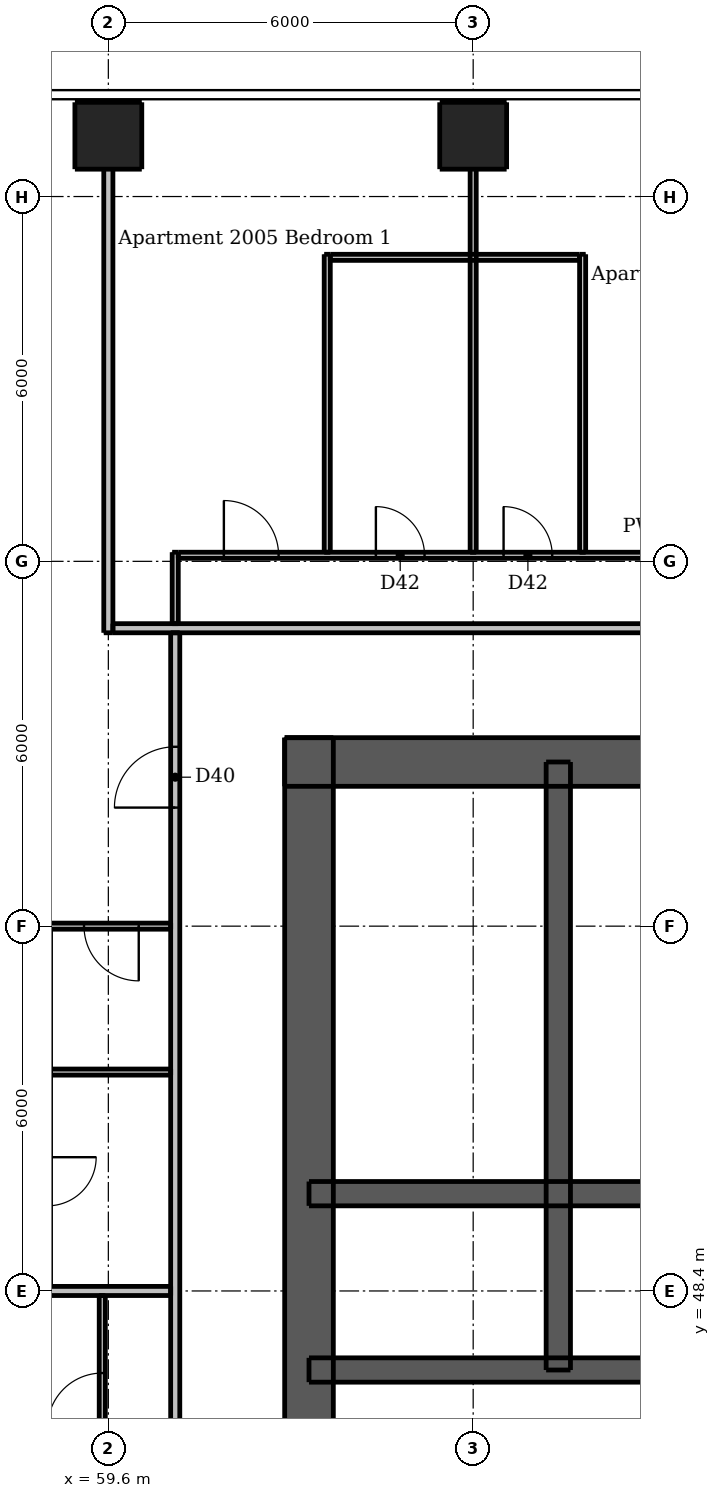
"""IFC4 building model, lengths in metres.
Left out: names, types, materials, properties, quantities, classifications, styles, units other than length and angle.
Written with IfcOpenShell. Run it as: python <this file> out.ifc"""

import sys

from ifc_helpers import new_model, si_unit, direction, frame, frame_2d, origin, origin_2d, place, context, subcontext, project, spatial, rectangle, extrude, element, fill, save


model = new_model("IFC4")
c1 = context("Model", 3, precision=1e-05, world=origin(), true_north=direction((0.0, 1.0)))
c2 = subcontext(c1, "Body", "Model", "MODEL_VIEW")
j1 = project(units=[si_unit("LENGTHUNIT", "METRE"), si_unit("PLANEANGLEUNIT", "RADIAN")], contexts=[c1])
p1 = place(None, origin())
s1 = spatial("IfcSite", under=j1, at=p1, CompositionType="ELEMENT")
p2 = place(p1, origin())
s2 = spatial("IfcBuilding", under=s1, at=p2, CompositionType="ELEMENT")
p3 = place(p2, frame((0.0, 0.0, 78.7)))
s3 = spatial("IfcBuildingStorey", under=s2, at=p3, CompositionType="ELEMENT", Elevation=78.7)
p4 = place(p3, frame((62.5, 57.1, 0.0), z_axis=(0.0, 0.0, 1.0), x_axis=(1.0, 0.0, 0.0)))
e1 = element("IfcWall", 1, at=p4, inside=s3, PredefinedType="SHEAR", context=c2, shape_type="SweptSolid", body=[
    extrude(rectangle(XDim=24.0, YDim=0.8, at=frame_2d((12.0, 0.0))), origin(), (0.0, 0.0, 1.0), 3.05),
])
p5 = place(p4, frame((20.9, 0.0, 0.0)))
e2 = element("IfcOpeningElement", 2, at=p5, cuts=e1, PredefinedType="OPENING", context=c2, shape_type="SweptSolid", body=[
    extrude(rectangle(XDim=1.1, YDim=2.1, at=frame_2d((0.55, 1.05))), frame((0.0, 0.41, 0.0), z_axis=(0.0, -1.0, 0.0), x_axis=(1.0, 0.0, 0.0)), (0.0, 0.0, 1.0), 0.82),
])
p6 = place(p4, frame((2.0, 0.0, 0.0)))
e3 = element("IfcOpeningElement", 3, at=p6, cuts=e1, PredefinedType="OPENING", context=c2, shape_type="SweptSolid", body=[
    extrude(rectangle(XDim=1.1, YDim=2.1, at=frame_2d((0.55, 1.05))), frame((0.0, 0.41, 0.0), z_axis=(0.0, -1.0, 0.0), x_axis=(1.0, 0.0, 0.0)), (0.0, 0.0, 1.0), 0.82),
])
p7 = place(p4, frame((6.075, 0.0, 0.0)))
e4 = element("IfcOpeningElement", 4, at=p7, cuts=e1, PredefinedType="OPENING", context=c2, shape_type="SweptSolid", body=[
    extrude(rectangle(XDim=0.9, YDim=2.1, at=frame_2d((0.45, 1.05))), frame((0.0, 0.41, 0.0), z_axis=(0.0, -1.0, 0.0), x_axis=(1.0, 0.0, 0.0)), (0.0, 0.0, 1.0), 0.82),
])
p8 = place(p4, frame((10.455, 0.0, 0.0)))
e5 = element("IfcOpeningElement", 5, at=p8, cuts=e1, PredefinedType="OPENING", context=c2, shape_type="SweptSolid", body=[
    extrude(rectangle(XDim=0.9, YDim=2.1, at=frame_2d((0.45, 1.05))), frame((0.0, 0.41, 0.0), z_axis=(0.0, -1.0, 0.0), x_axis=(1.0, 0.0, 0.0)), (0.0, 0.0, 1.0), 0.82),
])
p9 = place(p4, frame((15.93, 0.0, 0.0)))
e6 = element("IfcOpeningElement", 6, at=p9, cuts=e1, PredefinedType="OPENING", context=c2, shape_type="SweptSolid", body=[
    extrude(rectangle(XDim=0.9, YDim=2.1, at=frame_2d((0.45, 1.05))), frame((0.0, 0.41, 0.0), z_axis=(0.0, -1.0, 0.0), x_axis=(1.0, 0.0, 0.0)), (0.0, 0.0, 1.0), 0.82),
])
p10 = place(p3, frame((62.9, 33.5, 0.0), z_axis=(0.0, 0.0, 1.0), x_axis=(0.0, 1.0, 0.0)))
e7 = element("IfcWall", 7, at=p10, inside=s3, PredefinedType="SHEAR", context=c2, shape_type="SweptSolid", body=[
    extrude(rectangle(XDim=24.0, YDim=0.8, at=frame_2d((12.0, 0.0))), origin(), (0.0, 0.0, 1.0), 3.05),
])
p11 = place(p10, frame((11.2, 0.0, 0.0)))
e8 = element("IfcOpeningElement", 8, at=p11, cuts=e7, PredefinedType="OPENING", context=c2, shape_type="SweptSolid", body=[
    extrude(rectangle(XDim=1.6, YDim=2.1, at=frame_2d((0.8, 1.05))), frame((0.0, 0.41, 0.0), z_axis=(0.0, -1.0, 0.0), x_axis=(1.0, 0.0, 0.0)), (0.0, 0.0, 1.0), 0.82),
])
p12 = place(p3, frame((62.9, 47.1, 0.0), z_axis=(0.0, 0.0, 1.0), x_axis=(1.0, 0.0, 0.0)))
e9 = element("IfcWall", 9, at=p12, inside=s3, PredefinedType="SHEAR", context=c2, shape_type="SweptSolid", body=[
    extrude(rectangle(XDim=23.2, YDim=0.4, at=frame_2d((11.6, 0.0))), origin(), (0.0, 0.0, 1.0), 3.05),
])
p13 = place(p12, frame((1.7, 0.0, 0.0)))
e10 = element("IfcOpeningElement", 10, at=p13, cuts=e9, PredefinedType="OPENING", context=c2, shape_type="SweptSolid", body=[
    extrude(rectangle(XDim=0.9, YDim=2.1, at=frame_2d((0.45, 1.05))), frame((0.0, 0.21, 0.0), z_axis=(0.0, -1.0, 0.0), x_axis=(1.0, 0.0, 0.0)), (0.0, 0.0, 1.0), 0.42),
])
p14 = place(p12, frame((20.6, 0.0, 0.0)))
e11 = element("IfcOpeningElement", 11, at=p14, cuts=e9, PredefinedType="OPENING", context=c2, shape_type="SweptSolid", body=[
    extrude(rectangle(XDim=0.9, YDim=2.1, at=frame_2d((0.45, 1.05))), frame((0.0, 0.21, 0.0), z_axis=(0.0, -1.0, 0.0), x_axis=(1.0, 0.0, 0.0)), (0.0, 0.0, 1.0), 0.42),
])
p15 = place(p3, frame((62.9, 50.0, 0.0), z_axis=(0.0, 0.0, 1.0), x_axis=(1.0, 0.0, 0.0)))
e12 = element("IfcWall", 12, at=p15, inside=s3, PredefinedType="SHEAR", context=c2, shape_type="SweptSolid", body=[
    extrude(rectangle(XDim=23.2, YDim=0.4, at=frame_2d((11.6, 0.0))), origin(), (0.0, 0.0, 1.0), 3.05),
])
p16 = place(p3, frame((67.0, 47.1, 0.0), z_axis=(0.0, 0.0, 1.0), x_axis=(0.0, 1.0, 0.0)))
e13 = element("IfcWall", 13, at=p16, inside=s3, PredefinedType="SHEAR", context=c2, shape_type="SweptSolid", body=[
    extrude(rectangle(XDim=10.0, YDim=0.4, at=frame_2d((5.0, 0.0))), origin(), (0.0, 0.0, 1.0), 3.05),
])
for number, where, z_axis, x_axis in (
    (14, (59.6, 67.4, 0.0), (0.0, 0.0, 1.0), (1.0, 0.0, 0.0)),
    (15, (65.6, 67.4, 0.0), (0.0, 0.0, 1.0), (1.0, 0.0, 0.0)),
):
    element("IfcColumn", number, at=place(p3, frame(where, z_axis=z_axis, x_axis=x_axis)), inside=s3, PredefinedType="COLUMN", context=c2, shape_type="SweptSolid", body=[
        extrude(rectangle(XDim=1.1, YDim=1.1, at=origin_2d()), origin(), (0.0, 0.0, 1.0), 3.05),
    ])
p17 = place(p3, frame((59.5, 31.65, 0.0), z_axis=(0.0, 0.0, 1.0), x_axis=(0.0, 1.0, 0.0)))
e16 = element("IfcWall", 16, at=p17, inside=s3, PredefinedType="PARTITIONING", context=c2, shape_type="SweptSolid", body=[
    extrude(rectangle(XDim=16.675, YDim=0.1, at=frame_2d((8.337, 0.0))), origin(), (0.0, 0.0, 1.0), 2.51),
])
p18 = place(p17, frame((0.75, 0.0, 0.0)))
e17 = element("IfcOpeningElement", 17, at=p18, cuts=e16, PredefinedType="OPENING", context=c2, shape_type="SweptSolid", body=[
    extrude(rectangle(XDim=0.9, YDim=2.1, at=frame_2d((0.45, 1.05))), frame((0.0, 0.06, 0.0), z_axis=(0.0, -1.0, 0.0), x_axis=(1.0, 0.0, 0.0)), (0.0, 0.0, 1.0), 0.12),
])
p19 = place(p17, frame((3.1, 0.0, 0.0)))
e18 = element("IfcOpeningElement", 18, at=p19, cuts=e16, PredefinedType="OPENING", context=c2, shape_type="SweptSolid", body=[
    extrude(rectangle(XDim=0.9, YDim=2.1, at=frame_2d((0.45, 1.05))), frame((0.0, 0.06, 0.0), z_axis=(0.0, -1.0, 0.0), x_axis=(1.0, 0.0, 0.0)), (0.0, 0.0, 1.0), 0.12),
])
p20 = place(p17, frame((8.5, 0.0, 0.0)))
e19 = element("IfcOpeningElement", 19, at=p20, cuts=e16, PredefinedType="OPENING", context=c2, shape_type="SweptSolid", body=[
    extrude(rectangle(XDim=0.9, YDim=2.1, at=frame_2d((0.45, 1.05))), frame((0.0, 0.06, 0.0), z_axis=(0.0, -1.0, 0.0), x_axis=(1.0, 0.0, 0.0)), (0.0, 0.0, 1.0), 0.12),
])
p21 = place(p17, frame((14.5, 0.0, 0.0)))
e20 = element("IfcOpeningElement", 20, at=p21, cuts=e16, PredefinedType="OPENING", context=c2, shape_type="SweptSolid", body=[
    extrude(rectangle(XDim=0.9, YDim=2.1, at=frame_2d((0.45, 1.05))), frame((0.0, 0.06, 0.0), z_axis=(0.0, -1.0, 0.0), x_axis=(1.0, 0.0, 0.0)), (0.0, 0.0, 1.0), 0.12),
])
p22 = place(p17, frame((5.55, 0.0, 0.0)))
e21 = element("IfcOpeningElement", 21, at=p22, cuts=e16, PredefinedType="OPENING", context=c2, shape_type="SweptSolid", body=[
    extrude(rectangle(XDim=0.8, YDim=2.1, at=frame_2d((0.4, 1.05))), frame((0.0, 0.06, 0.0), z_axis=(0.0, -1.0, 0.0), x_axis=(1.0, 0.0, 0.0)), (0.0, 0.0, 1.0), 0.12),
])
p23 = place(p17, frame((11.55, 0.0, 0.0)))
e22 = element("IfcOpeningElement", 22, at=p23, cuts=e16, PredefinedType="OPENING", context=c2, shape_type="SweptSolid", body=[
    extrude(rectangle(XDim=0.8, YDim=2.1, at=frame_2d((0.4, 1.05))), frame((0.0, 0.06, 0.0), z_axis=(0.0, -1.0, 0.0), x_axis=(1.0, 0.0, 0.0)), (0.0, 0.0, 1.0), 0.12),
])
p24 = place(p3, frame((60.7, 59.375, 0.0), z_axis=(0.0, 0.0, 1.0), x_axis=(0.0, 1.0, 0.0)))
e23 = element("IfcWall", 23, at=p24, inside=s3, PredefinedType="PARTITIONING", context=c2, shape_type="SweptSolid", body=[
    extrude(rectangle(XDim=1.175, YDim=0.1, at=frame_2d((0.587, 0.0))), origin(), (0.0, 0.0, 1.0), 3.05),
])
p25 = place(p3, frame((63.2, 60.55, 0.0), z_axis=(0.0, 0.0, 1.0), x_axis=(0.0, 1.0, 0.0)))
e24 = element("IfcWall", 24, at=p25, inside=s3, PredefinedType="PARTITIONING", context=c2, shape_type="SweptSolid", body=[
    extrude(rectangle(XDim=4.9, YDim=0.1, at=frame_2d((2.45, 0.0))), origin(), (0.0, 0.0, 1.0), 3.05),
])
p26 = place(p3, frame((65.6, 60.55, 0.0), z_axis=(0.0, 0.0, 1.0), x_axis=(0.0, 1.0, 0.0)))
e25 = element("IfcWall", 25, at=p26, inside=s3, PredefinedType="PARTITIONING", context=c2, shape_type="SweptSolid", body=[
    extrude(rectangle(XDim=7.45, YDim=0.1, at=frame_2d((3.725, 0.0))), origin(), (0.0, 0.0, 1.0), 2.516),
])
p27 = place(p3, frame((67.4, 60.55, 0.0), z_axis=(0.0, 0.0, 1.0), x_axis=(0.0, 1.0, 0.0)))
e26 = element("IfcWall", 26, at=p27, inside=s3, PredefinedType="PARTITIONING", context=c2, shape_type="SweptSolid", body=[
    extrude(rectangle(XDim=4.9, YDim=0.1, at=frame_2d((2.45, 0.0))), origin(), (0.0, 0.0, 1.0), 3.05),
])
p28 = place(p3, frame((63.25, 65.4, 0.0), z_axis=(0.0, 0.0, 1.0), x_axis=(1.0, 0.0, 0.0)))
e27 = element("IfcWall", 27, at=p28, inside=s3, PredefinedType="PARTITIONING", context=c2, shape_type="SweptSolid", body=[
    extrude(rectangle(XDim=4.1, YDim=0.1, at=frame_2d((2.05, 0.0))), origin(), (0.0, 0.0, 1.0), 3.05),
])
p29 = place(p3, frame((60.75, 60.5, 0.0), z_axis=(0.0, 0.0, 1.0), x_axis=(1.0, 0.0, 0.0)))
e28 = element("IfcWall", 28, at=p29, inside=s3, PredefinedType="PARTITIONING", context=c2, shape_type="SweptSolid", body=[
    extrude(rectangle(XDim=16.775, YDim=0.1, at=frame_2d((8.387, 0.0))), origin(), (0.0, 0.0, 1.0), 3.05),
])
p30 = place(p29, frame((8.9, 0.0, 0.0)))
e29 = element("IfcOpeningElement", 29, at=p30, cuts=e28, PredefinedType="OPENING", context=c2, shape_type="SweptSolid", body=[
    extrude(rectangle(XDim=0.9, YDim=2.1, at=frame_2d((0.45, 1.05))), frame((0.0, 0.06, 0.0), z_axis=(0.0, -1.0, 0.0), x_axis=(1.0, 0.0, 0.0)), (0.0, 0.0, 1.0), 0.12),
])
p31 = place(p29, frame((14.9, 0.0, 0.0)))
e30 = element("IfcOpeningElement", 30, at=p31, cuts=e28, PredefinedType="OPENING", context=c2, shape_type="SweptSolid", body=[
    extrude(rectangle(XDim=0.9, YDim=2.1, at=frame_2d((0.45, 1.05))), frame((0.0, 0.06, 0.0), z_axis=(0.0, -1.0, 0.0), x_axis=(1.0, 0.0, 0.0)), (0.0, 0.0, 1.0), 0.12),
])
p32 = place(p29, frame((12.5, 0.0, 0.0)))
e31 = element("IfcOpeningElement", 31, at=p32, cuts=e28, PredefinedType="OPENING", context=c2, shape_type="SweptSolid", body=[
    extrude(rectangle(XDim=0.9, YDim=2.1, at=frame_2d((0.45, 1.05))), frame((0.0, 0.06, 0.0), z_axis=(0.0, -1.0, 0.0), x_axis=(1.0, 0.0, 0.0)), (0.0, 0.0, 1.0), 0.12),
])
p33 = place(p29, frame((5.35, 0.0, 0.0)))
e32 = element("IfcOpeningElement", 32, at=p33, cuts=e28, PredefinedType="OPENING", context=c2, shape_type="SweptSolid", body=[
    extrude(rectangle(XDim=0.8, YDim=2.1, at=frame_2d((0.4, 1.05))), frame((0.0, 0.06, 0.0), z_axis=(0.0, -1.0, 0.0), x_axis=(1.0, 0.0, 0.0)), (0.0, 0.0, 1.0), 0.12),
])
p34 = place(p29, frame((0.75, 0.0, 0.0)))
e33 = element("IfcOpeningElement", 33, at=p34, cuts=e28, PredefinedType="OPENING", context=c2, shape_type="SweptSolid", body=[
    extrude(rectangle(XDim=0.9, YDim=2.1, at=frame_2d((0.45, 1.05))), frame((0.0, 0.06, 0.0), z_axis=(0.0, -1.0, 0.0), x_axis=(1.0, 0.0, 0.0)), (0.0, 0.0, 1.0), 0.12),
])
p35 = place(p29, frame((3.25, 0.0, 0.0)))
e34 = element("IfcOpeningElement", 34, at=p35, cuts=e28, PredefinedType="OPENING", context=c2, shape_type="SweptSolid", body=[
    extrude(rectangle(XDim=0.8, YDim=2.1, at=frame_2d((0.4, 1.05))), frame((0.0, 0.06, 0.0), z_axis=(0.0, -1.0, 0.0), x_axis=(1.0, 0.0, 0.0)), (0.0, 0.0, 1.0), 0.12),
])
p36 = place(p3, frame((60.625, 54.4, 0.0), z_axis=(0.0, 0.0, 1.0), x_axis=(-1.0, 0.0, 0.0)))
e35 = element("IfcWall", 35, at=p36, inside=s3, PredefinedType="PARTITIONING", context=c2, shape_type="SweptSolid", body=[
    extrude(rectangle(XDim=8.625, YDim=0.1, at=frame_2d((4.312, 0.0))), origin(), (0.0, 0.0, 1.0), 2.516),
])
p37 = place(p36, frame((0.525, 0.0, 0.0)))
e36 = element("IfcOpeningElement", 36, at=p37, cuts=e35, PredefinedType="OPENING", context=c2, shape_type="SweptSolid", body=[
    extrude(rectangle(XDim=0.9, YDim=2.1, at=frame_2d((0.45, 1.05))), frame((0.0, 0.06, 0.0), z_axis=(0.0, -1.0, 0.0), x_axis=(1.0, 0.0, 0.0)), (0.0, 0.0, 1.0), 0.12),
])
p38 = place(p36, frame((4.875, 0.0, 0.0)))
e37 = element("IfcOpeningElement", 37, at=p38, cuts=e35, PredefinedType="OPENING", context=c2, shape_type="SweptSolid", body=[
    extrude(rectangle(XDim=0.9, YDim=2.1, at=frame_2d((0.45, 1.05))), frame((0.0, 0.06, 0.0), z_axis=(0.0, -1.0, 0.0), x_axis=(1.0, 0.0, 0.0)), (0.0, 0.0, 1.0), 0.12),
])
p39 = place(p3, frame((58.65, 52.0, 0.0), z_axis=(0.0, 0.0, 1.0), x_axis=(1.0, 0.0, 0.0)))
e38 = element("IfcWall", 38, at=p39, inside=s3, PredefinedType="PARTITIONING", context=c2, shape_type="SweptSolid", body=[
    extrude(rectangle(XDim=1.975, YDim=0.1, at=frame_2d((0.988, 0.0))), origin(), (0.0, 0.0, 1.0), 3.05),
])
p40 = place(p3, frame((59.6, 59.225, 0.0), z_axis=(0.0, 0.0, 1.0), x_axis=(0.0, 1.0, 0.0)))
e39 = element("IfcWall", 39, at=p40, inside=s3, PredefinedType="PARTITIONING", context=c2, shape_type="SweptSolid", body=[
    extrude(rectangle(XDim=8.775, YDim=0.15, at=frame_2d((4.387, 0.0))), origin(), (0.0, 0.0, 1.0), 2.51),
])
p41 = place(p3, frame((60.7, 30.325, 0.0), z_axis=(0.0, 0.0, 1.0), x_axis=(0.0, 1.0, 0.0)))
e40 = element("IfcWall", 40, at=p41, inside=s3, PredefinedType="PARTITIONING", context=c2, shape_type="SweptSolid", body=[
    extrude(rectangle(XDim=28.9, YDim=0.15, at=frame_2d((14.45, 0.0))), origin(), (0.0, 0.0, 1.0), 3.05),
])
p42 = place(p41, frame((9.225, 0.0, 0.0)))
e41 = element("IfcOpeningElement", 41, at=p42, cuts=e40, PredefinedType="OPENING", context=c2, shape_type="SweptSolid", body=[
    extrude(rectangle(XDim=1.0, YDim=2.1, at=frame_2d((0.5, 1.05))), frame((0.0, 0.085, 0.0), z_axis=(0.0, -1.0, 0.0), x_axis=(1.0, 0.0, 0.0)), (0.0, 0.0, 1.0), 0.17),
])
p43 = place(p41, frame((26.025, 0.0, 0.0)))
e42 = element("IfcOpeningElement", 42, at=p43, cuts=e40, PredefinedType="OPENING", context=c2, shape_type="SweptSolid", body=[
    extrude(rectangle(XDim=1.0, YDim=2.1, at=frame_2d((0.5, 1.05))), frame((0.0, 0.085, 0.0), z_axis=(0.0, -1.0, 0.0), x_axis=(1.0, 0.0, 0.0)), (0.0, 0.0, 1.0), 0.17),
])
p44 = place(p3, frame((59.675, 59.3, 0.0), z_axis=(0.0, 0.0, 1.0), x_axis=(1.0, 0.0, 0.0)))
e43 = element("IfcWall", 43, at=p44, inside=s3, PredefinedType="PARTITIONING", context=c2, shape_type="SweptSolid", body=[
    extrude(rectangle(XDim=28.55, YDim=0.15, at=frame_2d((14.275, 0.0))), origin(), (0.0, 0.0, 1.0), 3.05),
])
p45 = place(p44, frame((8.975, 0.0, 0.0)))
e44 = element("IfcOpeningElement", 44, at=p45, cuts=e43, PredefinedType="OPENING", context=c2, shape_type="SweptSolid", body=[
    extrude(rectangle(XDim=1.0, YDim=2.1, at=frame_2d((0.5, 1.05))), frame((0.0, 0.085, 0.0), z_axis=(0.0, -1.0, 0.0), x_axis=(1.0, 0.0, 0.0)), (0.0, 0.0, 1.0), 0.17),
])
p46 = place(p44, frame((25.775, 0.0, 0.0)))
e45 = element("IfcOpeningElement", 45, at=p46, cuts=e43, PredefinedType="OPENING", context=c2, shape_type="SweptSolid", body=[
    extrude(rectangle(XDim=1.0, YDim=2.1, at=frame_2d((0.5, 1.05))), frame((0.0, 0.085, 0.0), z_axis=(0.0, -1.0, 0.0), x_axis=(1.0, 0.0, 0.0)), (0.0, 0.0, 1.0), 0.17),
])
p47 = place(p3, frame((52.0, 48.4, 0.0), z_axis=(0.0, 0.0, 1.0), x_axis=(1.0, 0.0, 0.0)))
e46 = element("IfcWall", 46, at=p47, inside=s3, PredefinedType="PARTITIONING", context=c2, shape_type="SweptSolid", body=[
    extrude(rectangle(XDim=8.625, YDim=0.15, at=frame_2d((4.312, 0.0))), origin(), (0.0, 0.0, 1.0), 2.516),
])
p48 = place(p6, origin())
e47 = element("IfcDoor", 47, at=p48, inside=s3, OperationType="SINGLE_SWING_LEFT", PredefinedType="DOOR", context=c2, shape_type="SweptSolid", body=[
    extrude(rectangle(XDim=1.1, YDim=2.1, at=frame_2d((0.55, 1.05))), frame((0.0, -0.337, 0.0), z_axis=(0.0, -1.0, 0.0), x_axis=(1.0, 0.0, 0.0)), (0.0, 0.0, 1.0), 0.05),
])
fill(e3, e47)
p49 = place(p13, origin())
e48 = element("IfcDoor", 48, at=p49, inside=s3, OperationType="SINGLE_SWING_LEFT", PredefinedType="DOOR", context=c2, shape_type="SweptSolid", body=[
    extrude(rectangle(XDim=0.9, YDim=2.1, at=frame_2d((0.45, 1.05))), frame((0.0, 0.188, 0.0), z_axis=(0.0, -1.0, 0.0), x_axis=(1.0, 0.0, 0.0)), (0.0, 0.0, 1.0), 0.05),
])
fill(e10, e48)
p50 = place(p33, origin())
e49 = element("IfcDoor", 49, at=p50, inside=s3, OperationType="SINGLE_SWING_LEFT", PredefinedType="DOOR", context=c2, shape_type="SweptSolid", body=[
    extrude(rectangle(XDim=0.8, YDim=2.1, at=frame_2d((0.4, 1.05))), frame((0.0, 0.025, 0.0), z_axis=(0.0, -1.0, 0.0), x_axis=(1.0, 0.0, 0.0)), (0.0, 0.0, 1.0), 0.05),
])
fill(e32, e49)
p51 = place(p34, origin())
e50 = element("IfcDoor", 50, at=p51, inside=s3, OperationType="SINGLE_SWING_LEFT", PredefinedType="DOOR", context=c2, shape_type="SweptSolid", body=[
    extrude(rectangle(XDim=0.9, YDim=2.1, at=frame_2d((0.45, 1.05))), frame((0.0, 0.025, 0.0), z_axis=(0.0, -1.0, 0.0), x_axis=(1.0, 0.0, 0.0)), (0.0, 0.0, 1.0), 0.05),
])
fill(e33, e50)
p52 = place(p35, origin())
e51 = element("IfcDoor", 51, at=p52, inside=s3, OperationType="SINGLE_SWING_LEFT", PredefinedType="DOOR", context=c2, shape_type="SweptSolid", body=[
    extrude(rectangle(XDim=0.8, YDim=2.1, at=frame_2d((0.4, 1.05))), frame((0.0, 0.025, 0.0), z_axis=(0.0, -1.0, 0.0), x_axis=(1.0, 0.0, 0.0)), (0.0, 0.0, 1.0), 0.05),
])
fill(e34, e51)
p53 = place(p21, origin())
e52 = element("IfcDoor", 52, at=p53, inside=s3, OperationType="SINGLE_SWING_LEFT", PredefinedType="DOOR", context=c2, shape_type="SweptSolid", body=[
    extrude(rectangle(XDim=0.9, YDim=2.1, at=frame_2d((0.45, 1.05))), frame((0.0, 0.025, 0.0), z_axis=(0.0, -1.0, 0.0), x_axis=(1.0, 0.0, 0.0)), (0.0, 0.0, 1.0), 0.05),
])
fill(e20, e52)
p54 = place(p43, origin())
e53 = element("IfcDoor", 53, at=p54, inside=s3, OperationType="SINGLE_SWING_LEFT", PredefinedType="DOOR", context=c2, shape_type="SweptSolid", body=[
    extrude(rectangle(XDim=1.0, YDim=2.1, at=frame_2d((0.5, 1.05))), frame((0.0, 0.025, 0.0), z_axis=(0.0, -1.0, 0.0), x_axis=(1.0, 0.0, 0.0)), (0.0, 0.0, 1.0), 0.05),
])
fill(e42, e53)
p55 = place(p37, origin())
e54 = element("IfcDoor", 54, at=p55, inside=s3, OperationType="SINGLE_SWING_LEFT", PredefinedType="DOOR", context=c2, shape_type="SweptSolid", body=[
    extrude(rectangle(XDim=0.9, YDim=2.1, at=frame_2d((0.45, 1.05))), frame((0.0, 0.025, 0.0), z_axis=(0.0, -1.0, 0.0), x_axis=(1.0, 0.0, 0.0)), (0.0, 0.0, 1.0), 0.05),
])
fill(e36, e54)
save(model, sys.argv[1])
